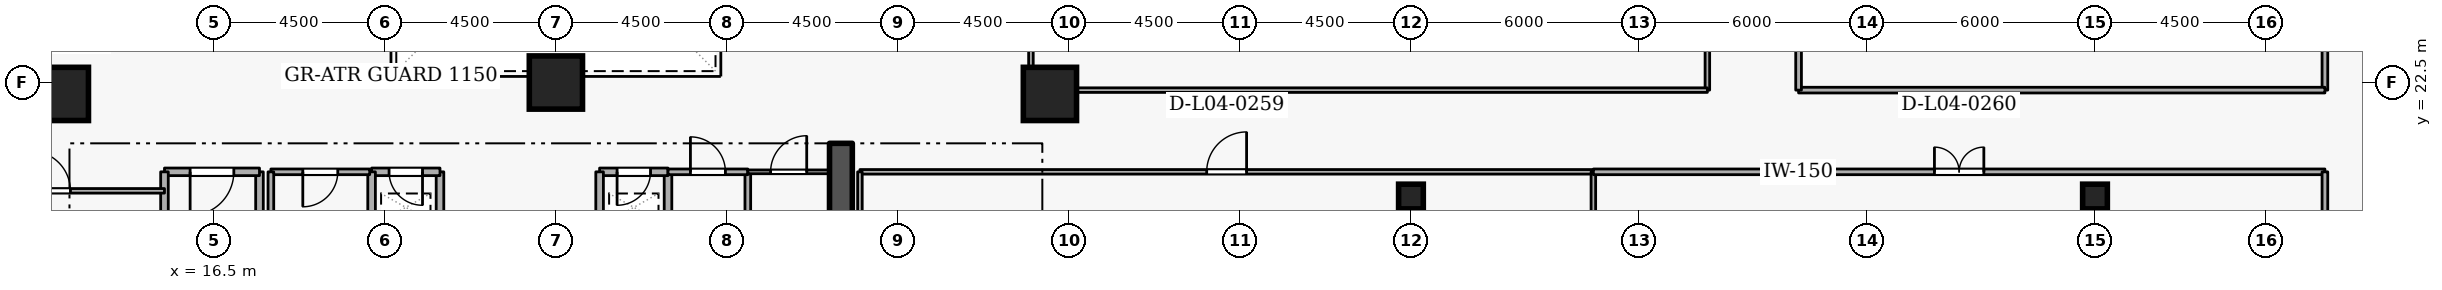
"""IFC4 building model, lengths in metres.
Left out: names, types, materials, properties, quantities, classifications, styles, units other than length and angle.
Written with IfcOpenShell. Run it as: python <this file> out.ifc"""

import sys

from ifc_helpers import new_model, si_unit, direction, frame, frame_2d, origin, origin_2d, place, context, subcontext, project, spatial, rectangle, extrude, element, fill, save


model = new_model("IFC4")
c1 = context("Model", 3, precision=1e-05, world=origin(), true_north=direction((0.0, 1.0)))
c2 = subcontext(c1, "Body", "Model", "MODEL_VIEW")
j1 = project(units=[si_unit("LENGTHUNIT", "METRE"), si_unit("PLANEANGLEUNIT", "RADIAN")], contexts=[c1])
p1 = place(None, origin())
s1 = spatial("IfcSite", under=j1, at=p1, CompositionType="ELEMENT")
p2 = place(p1, origin())
s2 = spatial("IfcBuilding", under=s1, at=p2, CompositionType="ELEMENT")
p3 = place(p2, frame((0.0, 0.0, 18.6)))
s3 = spatial("IfcBuildingStorey", under=s2, at=p3, CompositionType="ELEMENT", Elevation=18.6)
p4 = place(p3, frame((33.0, 15.2, 0.0), z_axis=(0.0, 0.0, 1.0), x_axis=(0.0, 1.0, 0.0)))
e1 = element("IfcWall", 1, at=p4, inside=s3, PredefinedType="SHEAR", context=c2, shape_type="SweptSolid", body=[
    extrude(rectangle(XDim=5.7, YDim=0.6, at=frame_2d((2.85, 0.0))), origin(), (0.0, 0.0, 1.0), 4.5),
])
for number, where, z_axis, x_axis in (
    (2, (12.5, 22.2, 0.0), (0.0, 0.0, 1.0), (1.0, 0.0, 0.0)),
    (3, (38.5, 22.2, 0.0), (0.0, 0.0, 1.0), (1.0, 0.0, 0.0)),
    (4, (25.5, 22.5, 0.0), (0.0, 0.0, 1.0), (1.0, 0.0, 0.0)),
):
    element("IfcColumn", number, at=place(p3, frame(where, z_axis=z_axis, x_axis=x_axis)), inside=s3, PredefinedType="COLUMN", context=c2, shape_type="SweptSolid", body=[
        extrude(rectangle(XDim=1.4, YDim=1.4, at=origin_2d()), origin(), (0.0, 0.0, 1.0), 4.5),
    ])
for number, where, z_axis, x_axis in (
    (5, (48.0, 19.5, 0.0), (0.0, 0.0, 1.0), (1.0, 0.0, 0.0)),
    (6, (66.0, 19.5, 0.0), (0.0, 0.0, 1.0), (1.0, 0.0, 0.0)),
):
    element("IfcColumn", number, at=place(p3, frame(where, z_axis=z_axis, x_axis=x_axis)), inside=s3, PredefinedType="COLUMN", context=c2, shape_type="SweptSolid", body=[
        extrude(rectangle(XDim=0.65, YDim=0.65, at=origin_2d()), origin(), (0.0, 0.0, 1.0), 4.5),
    ])
p5 = place(p3, frame((17.7, 18.4, 0.0), z_axis=(0.0, 0.0, 1.0), x_axis=(0.0, 1.0, 0.0)))
e7 = element("IfcWall", 7, at=p5, inside=s3, PredefinedType="STANDARD", context=c2, shape_type="SweptSolid", body=[
    extrude(rectangle(XDim=1.75, YDim=0.2, at=frame_2d((0.875, 0.0))), origin(), (0.0, 0.0, 1.0), 3.365),
])
p6 = place(p3, frame((17.7, 20.15, 0.0), z_axis=(0.0, 0.0, 1.0), x_axis=(-1.0, 0.0, 0.0)))
e8 = element("IfcWall", 8, at=p6, inside=s3, PredefinedType="STANDARD", context=c2, shape_type="SweptSolid", body=[
    extrude(rectangle(XDim=2.5, YDim=0.2, at=frame_2d((1.25, 0.0))), origin(), (0.0, 0.0, 1.0), 4.16),
])
p7 = place(p6, frame((0.675, 0.0, 0.0)))
e9 = element("IfcOpeningElement", 9, at=p7, cuts=e8, PredefinedType="OPENING", context=c2, shape_type="SweptSolid", body=[
    extrude(rectangle(XDim=1.15, YDim=2.1, at=frame_2d((0.575, 1.05))), frame((0.0, 0.11, 0.0), z_axis=(0.0, -1.0, 0.0), x_axis=(1.0, 0.0, 0.0)), (0.0, 0.0, 1.0), 0.22),
])
p8 = place(p3, frame((15.2, 20.15, 0.0), z_axis=(0.0, 0.0, 1.0), x_axis=(0.0, -1.0, 0.0)))
e10 = element("IfcWall", 10, at=p8, inside=s3, PredefinedType="STANDARD", context=c2, shape_type="SweptSolid", body=[
    extrude(rectangle(XDim=5.15, YDim=0.2, at=frame_2d((2.575, 0.0))), origin(), (0.0, 0.0, 1.0), 4.16),
])
p9 = place(p3, frame((28.45, 18.65, 0.0), z_axis=(0.0, 0.0, 1.0), x_axis=(0.0, 1.0, 0.0)))
e11 = element("IfcWall", 11, at=p9, inside=s3, PredefinedType="STANDARD", context=c2, shape_type="SweptSolid", body=[
    extrude(rectangle(XDim=1.5, YDim=0.2, at=frame_2d((0.75, 0.0))), origin(), (0.0, 0.0, 1.0), 4.16),
])
p10 = place(p3, frame((28.45, 20.15, 0.0), z_axis=(0.0, 0.0, 1.0), x_axis=(-1.0, 0.0, 0.0)))
e12 = element("IfcWall", 12, at=p10, inside=s3, PredefinedType="STANDARD", context=c2, shape_type="SweptSolid", body=[
    extrude(rectangle(XDim=1.8, YDim=0.2, at=frame_2d((0.9, 0.0))), origin(), (0.0, 0.0, 1.0), 4.16),
])
p11 = place(p10, frame((0.46, 0.0, 0.0)))
e13 = element("IfcOpeningElement", 13, at=p11, cuts=e12, PredefinedType="OPENING", context=c2, shape_type="SweptSolid", body=[
    extrude(rectangle(XDim=0.88, YDim=2.04, at=frame_2d((0.44, 1.02))), frame((0.0, 0.11, 0.0), z_axis=(0.0, -1.0, 0.0), x_axis=(1.0, 0.0, 0.0)), (0.0, 0.0, 1.0), 0.22),
])
for number, where, z_axis, x_axis in (
    (14, (26.65, 20.15, 0.0), (0.0, 0.0, 1.0), (0.0, -1.0, 0.0)),
    (15, (22.45, 18.65, 0.0), (0.0, 0.0, 1.0), (0.0, 1.0, 0.0)),
):
    element("IfcWall", number, at=place(p3, frame(where, z_axis=z_axis, x_axis=x_axis)), inside=s3, PredefinedType="STANDARD", context=c2, shape_type="SweptSolid", body=[
        extrude(rectangle(XDim=1.5, YDim=0.2, at=frame_2d((0.75, 0.0))), origin(), (0.0, 0.0, 1.0), 4.16),
    ])
p12 = place(p3, frame((22.45, 20.15, 0.0), z_axis=(0.0, 0.0, 1.0), x_axis=(-1.0, 0.0, 0.0)))
e16 = element("IfcWall", 16, at=p12, inside=s3, PredefinedType="STANDARD", context=c2, shape_type="SweptSolid", body=[
    extrude(rectangle(XDim=1.8, YDim=0.2, at=frame_2d((0.9, 0.0))), origin(), (0.0, 0.0, 1.0), 4.16),
])
p13 = place(p12, frame((0.46, 0.0, 0.0)))
e17 = element("IfcOpeningElement", 17, at=p13, cuts=e16, PredefinedType="OPENING", context=c2, shape_type="SweptSolid", body=[
    extrude(rectangle(XDim=0.88, YDim=2.04, at=frame_2d((0.44, 1.02))), frame((0.0, 0.11, 0.0), z_axis=(0.0, -1.0, 0.0), x_axis=(1.0, 0.0, 0.0)), (0.0, 0.0, 1.0), 0.22),
])
p14 = place(p3, frame((20.65, 20.15, 0.0), z_axis=(0.0, 0.0, 1.0), x_axis=(0.0, -1.0, 0.0)))
e18 = element("IfcWall", 18, at=p14, inside=s3, PredefinedType="STANDARD", context=c2, shape_type="SweptSolid", body=[
    extrude(rectangle(XDim=1.5, YDim=0.2, at=frame_2d((0.75, 0.0))), origin(), (0.0, 0.0, 1.0), 4.16),
])
p15 = place(p3, frame((20.6, 20.15, 0.0), z_axis=(0.0, 0.0, 1.0), x_axis=(-1.0, 0.0, 0.0)))
e19 = element("IfcWall", 19, at=p15, inside=s3, PredefinedType="PARTITIONING", context=c2, shape_type="SweptSolid", body=[
    extrude(rectangle(XDim=2.6, YDim=0.15, at=frame_2d((1.3, 0.0))), origin(), (0.0, 0.0, 1.0), 4.16),
])
p16 = place(p15, frame((0.84, 0.0, 0.0)))
e20 = element("IfcOpeningElement", 20, at=p16, cuts=e19, PredefinedType="OPENING", context=c2, shape_type="SweptSolid", body=[
    extrude(rectangle(XDim=0.92, YDim=2.08, at=frame_2d((0.46, 1.04))), frame((0.0, 0.085, 0.0), z_axis=(0.0, -1.0, 0.0), x_axis=(1.0, 0.0, 0.0)), (0.0, 0.0, 1.0), 0.17),
])
p17 = place(p3, frame((18.0, 20.15, 0.0), z_axis=(0.0, 0.0, 1.0), x_axis=(0.0, -1.0, 0.0)))
e21 = element("IfcWall", 21, at=p17, inside=s3, PredefinedType="PARTITIONING", context=c2, shape_type="SweptSolid", body=[
    extrude(rectangle(XDim=1.5, YDim=0.15, at=frame_2d((0.75, 0.0))), origin(), (0.0, 0.0, 1.0), 3.365),
])
p18 = place(p3, frame((30.55, 20.15, 0.0), z_axis=(0.0, 0.0, 1.0), x_axis=(0.0, -1.0, 0.0)))
e22 = element("IfcWall", 22, at=p18, inside=s3, PredefinedType="PARTITIONING", context=c2, shape_type="SweptSolid", body=[
    extrude(rectangle(XDim=1.5, YDim=0.15, at=frame_2d((0.75, 0.0))), origin(), (0.0, 0.0, 1.0), 4.16),
])
p19 = place(p3, frame((28.45, 20.15, 0.0), z_axis=(0.0, 0.0, 1.0), x_axis=(1.0, 0.0, 0.0)))
e23 = element("IfcWall", 23, at=p19, inside=s3, PredefinedType="PARTITIONING", context=c2, shape_type="SweptSolid", body=[
    extrude(rectangle(XDim=2.1, YDim=0.15, at=frame_2d((1.05, 0.0))), origin(), (0.0, 0.0, 1.0), 4.16),
])
p20 = place(p19, frame((0.59, 0.0, 0.0)))
e24 = element("IfcOpeningElement", 24, at=p20, cuts=e23, PredefinedType="OPENING", context=c2, shape_type="SweptSolid", body=[
    extrude(rectangle(XDim=0.92, YDim=2.08, at=frame_2d((0.46, 1.04))), frame((0.0, 0.085, 0.0), z_axis=(0.0, -1.0, 0.0), x_axis=(1.0, 0.0, 0.0)), (0.0, 0.0, 1.0), 0.17),
])
p21 = place(p3, frame((30.55, 20.15, 0.0), z_axis=(0.0, 0.0, 1.0), x_axis=(1.0, 0.0, 0.0)))
e25 = element("IfcWall", 25, at=p21, inside=s3, PredefinedType="PARTITIONING", context=c2, shape_type="SweptSolid", body=[
    extrude(rectangle(XDim=2.15, YDim=0.1, at=frame_2d((1.075, 0.0))), origin(), (0.0, 0.0, 1.0), 4.16),
])
p22 = place(p21, frame((0.6, 0.0, 0.0)))
e26 = element("IfcOpeningElement", 26, at=p22, cuts=e25, PredefinedType="OPENING", context=c2, shape_type="SweptSolid", body=[
    extrude(rectangle(XDim=0.95, YDim=2.1, at=frame_2d((0.475, 1.05))), frame((0.0, 0.06, 0.0), z_axis=(0.0, -1.0, 0.0), x_axis=(1.0, 0.0, 0.0)), (0.0, 0.0, 1.0), 0.12),
])
p23 = place(p3, frame((9.2, 19.65, 0.0), z_axis=(0.0, 0.0, 1.0), x_axis=(1.0, 0.0, 0.0)))
e27 = element("IfcWall", 27, at=p23, inside=s3, PredefinedType="PARTITIONING", context=c2, shape_type="SweptSolid", body=[
    extrude(rectangle(XDim=6.0, YDim=0.12, at=frame_2d((3.0, 0.0))), origin(), (0.0, 0.0, 1.0), 4.16),
])
p24 = place(p23, frame((2.475, 0.0, 0.0)))
e28 = element("IfcOpeningElement", 28, at=p24, cuts=e27, PredefinedType="OPENING", context=c2, shape_type="SweptSolid", body=[
    extrude(rectangle(XDim=1.05, YDim=2.1, at=frame_2d((0.525, 1.05))), frame((0.0, 0.07, 0.0), z_axis=(0.0, -1.0, 0.0), x_axis=(1.0, 0.0, 0.0)), (0.0, 0.0, 1.0), 0.14),
])
p25 = place(p3, frame((33.5, 20.15, 0.0), z_axis=(0.0, 0.0, 1.0), x_axis=(1.0, 0.0, 0.0)))
e29 = element("IfcWall", 29, at=p25, inside=s3, PredefinedType="PARTITIONING", context=c2, shape_type="SweptSolid", body=[
    extrude(rectangle(XDim=19.3, YDim=0.12, at=frame_2d((9.65, 0.0))), origin(), (0.0, 0.0, 1.0), 4.16),
])
p26 = place(p25, frame((9.125, 0.0, 0.0)))
e30 = element("IfcOpeningElement", 30, at=p26, cuts=e29, PredefinedType="OPENING", context=c2, shape_type="SweptSolid", body=[
    extrude(rectangle(XDim=1.05, YDim=2.1, at=frame_2d((0.525, 1.05))), frame((0.0, 0.07, 0.0), z_axis=(0.0, -1.0, 0.0), x_axis=(1.0, 0.0, 0.0)), (0.0, 0.0, 1.0), 0.14),
])
p27 = place(p3, frame((52.8, 20.15, 0.0), z_axis=(0.0, 0.0, 1.0), x_axis=(0.0, -1.0, 0.0)))
e31 = element("IfcWall", 31, at=p27, inside=s3, PredefinedType="PARTITIONING", context=c2, shape_type="SweptSolid", body=[
    extrude(rectangle(XDim=9.33, YDim=0.12, at=frame_2d((4.665, 0.0))), origin(), (0.0, 0.0, 1.0), 4.16),
])
p28 = place(p3, frame((33.5, 17.648, 0.0), z_axis=(0.0, 0.0, 1.0), x_axis=(0.0, 1.0, 0.0)))
e32 = element("IfcWall", 32, at=p28, inside=s3, PredefinedType="PARTITIONING", context=c2, shape_type="SweptSolid", body=[
    extrude(rectangle(XDim=2.502, YDim=0.12, at=frame_2d((1.251, 0.0))), origin(), (0.0, 0.0, 1.0), 4.16),
])
p29 = place(p3, frame((52.8, 20.15, 0.0), z_axis=(0.0, 0.0, 1.0), x_axis=(1.0, 0.0, 0.0)))
e33 = element("IfcWall", 33, at=p29, inside=s3, PredefinedType="PARTITIONING", context=c2, shape_type="SweptSolid", body=[
    extrude(rectangle(XDim=19.25, YDim=0.15, at=frame_2d((9.625, 0.0))), origin(), (0.0, 0.0, 1.0), 4.16),
])
p30 = place(p29, frame((8.975, 0.0, 0.0)))
e34 = element("IfcOpeningElement", 34, at=p30, cuts=e33, PredefinedType="OPENING", context=c2, shape_type="SweptSolid", body=[
    extrude(rectangle(XDim=1.3, YDim=2.12, at=frame_2d((0.65, 1.06))), frame((0.0, 0.085, 0.0), z_axis=(0.0, -1.0, 0.0), x_axis=(1.0, 0.0, 0.0)), (0.0, 0.0, 1.0), 0.17),
])
p31 = place(p3, frame((72.05, 20.15, 0.0), z_axis=(0.0, 0.0, 1.0), x_axis=(0.0, -1.0, 0.0)))
e35 = element("IfcWall", 35, at=p31, inside=s3, PredefinedType="PARTITIONING", context=c2, shape_type="SweptSolid", body=[
    extrude(rectangle(XDim=5.35, YDim=0.15, at=frame_2d((2.675, 0.0))), origin(), (0.0, 0.0, 1.0), 4.16),
])
p32 = place(p3, frame((55.8, 32.28, 0.0), z_axis=(0.0, 0.0, 1.0), x_axis=(0.0, -1.0, 0.0)))
e36 = element("IfcWall", 36, at=p32, inside=s3, PredefinedType="PARTITIONING", context=c2, shape_type="SweptSolid", body=[
    extrude(rectangle(XDim=9.98, YDim=0.12, at=frame_2d((4.99, 0.0))), origin(), (0.0, 0.0, 1.0), 4.16),
])
p33 = place(p3, frame((55.8, 22.3, 0.0), z_axis=(0.0, 0.0, 1.0), x_axis=(-1.0, 0.0, 0.0)))
e37 = element("IfcWall", 37, at=p33, inside=s3, PredefinedType="PARTITIONING", context=c2, shape_type="SweptSolid", body=[
    extrude(rectangle(XDim=17.8, YDim=0.12, at=frame_2d((8.9, 0.0))), origin(), (0.0, 0.0, 1.0), 4.16),
])
p34 = place(p3, frame((38.0, 22.3, 0.0), z_axis=(0.0, 0.0, 1.0), x_axis=(0.0, 1.0, 0.0)))
e38 = element("IfcWall", 38, at=p34, inside=s3, PredefinedType="PARTITIONING", context=c2, shape_type="SweptSolid", body=[
    extrude(rectangle(XDim=9.98, YDim=0.12, at=frame_2d((4.99, 0.0))), origin(), (0.0, 0.0, 1.0), 4.16),
])
p35 = place(p3, frame((72.05, 32.28, 0.0), z_axis=(0.0, 0.0, 1.0), x_axis=(0.0, -1.0, 0.0)))
e39 = element("IfcWall", 39, at=p35, inside=s3, PredefinedType="PARTITIONING", context=c2, shape_type="SweptSolid", body=[
    extrude(rectangle(XDim=9.98, YDim=0.15, at=frame_2d((4.99, 0.0))), origin(), (0.0, 0.0, 1.0), 4.16),
])
p36 = place(p3, frame((72.05, 22.3, 0.0), z_axis=(0.0, 0.0, 1.0), x_axis=(-1.0, 0.0, 0.0)))
e40 = element("IfcWall", 40, at=p36, inside=s3, PredefinedType="PARTITIONING", context=c2, shape_type="SweptSolid", body=[
    extrude(rectangle(XDim=13.85, YDim=0.15, at=frame_2d((6.925, 0.0))), origin(), (0.0, 0.0, 1.0), 4.16),
])
p37 = place(p3, frame((58.2, 22.3, 0.0), z_axis=(0.0, 0.0, 1.0), x_axis=(0.0, 1.0, 0.0)))
e41 = element("IfcWall", 41, at=p37, inside=s3, PredefinedType="PARTITIONING", context=c2, shape_type="SweptSolid", body=[
    extrude(rectangle(XDim=9.98, YDim=0.15, at=frame_2d((4.99, 0.0))), origin(), (0.0, 0.0, 1.0), 4.16),
])
p38 = place(p7, origin())
e42 = element("IfcDoor", 42, at=p38, inside=s3, OperationType="SINGLE_SWING_RIGHT", PredefinedType="DOOR", context=c2, shape_type="SweptSolid", body=[
    extrude(rectangle(XDim=1.15, YDim=2.1, at=frame_2d((0.575, 1.05))), frame((0.0, 0.025, 0.0), z_axis=(0.0, -1.0, 0.0), x_axis=(1.0, 0.0, 0.0)), (0.0, 0.0, 1.0), 0.05),
])
fill(e9, e42)
p39 = place(p11, origin())
e43 = element("IfcDoor", 43, at=p39, inside=s3, OperationType="SINGLE_SWING_RIGHT", PredefinedType="DOOR", context=c2, shape_type="SweptSolid", body=[
    extrude(rectangle(XDim=0.88, YDim=2.04, at=frame_2d((0.44, 1.02))), frame((0.0, 0.025, 0.0), z_axis=(0.0, -1.0, 0.0), x_axis=(1.0, 0.0, 0.0)), (0.0, 0.0, 1.0), 0.05),
])
fill(e13, e43)
p40 = place(p13, origin())
e44 = element("IfcDoor", 44, at=p40, inside=s3, OperationType="SINGLE_SWING_LEFT", PredefinedType="DOOR", context=c2, shape_type="SweptSolid", body=[
    extrude(rectangle(XDim=0.88, YDim=2.04, at=frame_2d((0.44, 1.02))), frame((0.0, 0.025, 0.0), z_axis=(0.0, -1.0, 0.0), x_axis=(1.0, 0.0, 0.0)), (0.0, 0.0, 1.0), 0.05),
])
fill(e17, e44)
p41 = place(p16, origin())
e45 = element("IfcDoor", 45, at=p41, inside=s3, OperationType="SINGLE_SWING_RIGHT", PredefinedType="DOOR", context=c2, shape_type="SweptSolid", body=[
    extrude(rectangle(XDim=0.92, YDim=2.08, at=frame_2d((0.46, 1.04))), frame((0.0, 0.025, 0.0), z_axis=(0.0, -1.0, 0.0), x_axis=(1.0, 0.0, 0.0)), (0.0, 0.0, 1.0), 0.05),
])
fill(e20, e45)
p42 = place(p20, origin())
e46 = element("IfcDoor", 46, at=p42, inside=s3, OperationType="SINGLE_SWING_LEFT", PredefinedType="DOOR", context=c2, shape_type="SweptSolid", body=[
    extrude(rectangle(XDim=0.92, YDim=2.08, at=frame_2d((0.46, 1.04))), frame((0.0, 0.025, 0.0), z_axis=(0.0, -1.0, 0.0), x_axis=(1.0, 0.0, 0.0)), (0.0, 0.0, 1.0), 0.05),
])
fill(e24, e46)
p43 = place(p22, origin())
e47 = element("IfcDoor", 47, at=p43, inside=s3, OperationType="SINGLE_SWING_RIGHT", PredefinedType="DOOR", context=c2, shape_type="SweptSolid", body=[
    extrude(rectangle(XDim=0.95, YDim=2.1, at=frame_2d((0.475, 1.05))), frame((0.0, 0.025, 0.0), z_axis=(0.0, -1.0, 0.0), x_axis=(1.0, 0.0, 0.0)), (0.0, 0.0, 1.0), 0.05),
])
fill(e26, e47)
p44 = place(p24, origin())
e48 = element("IfcDoor", 48, at=p44, inside=s3, OperationType="SINGLE_SWING_LEFT", PredefinedType="DOOR", context=c2, shape_type="SweptSolid", body=[
    extrude(rectangle(XDim=1.05, YDim=2.1, at=frame_2d((0.525, 1.05))), frame((0.0, 0.025, 0.0), z_axis=(0.0, -1.0, 0.0), x_axis=(1.0, 0.0, 0.0)), (0.0, 0.0, 1.0), 0.05),
])
fill(e28, e48)
p45 = place(p26, origin())
e49 = element("IfcDoor", 49, at=p45, inside=s3, OperationType="SINGLE_SWING_RIGHT", PredefinedType="DOOR", context=c2, shape_type="SweptSolid", body=[
    extrude(rectangle(XDim=1.05, YDim=2.1, at=frame_2d((0.525, 1.05))), frame((0.0, 0.025, 0.0), z_axis=(0.0, -1.0, 0.0), x_axis=(1.0, 0.0, 0.0)), (0.0, 0.0, 1.0), 0.05),
])
fill(e30, e49)
p46 = place(p30, origin())
e50 = element("IfcDoor", 50, at=p46, inside=s3, OperationType="DOUBLE_DOOR_SINGLE_SWING", PredefinedType="DOOR", context=c2, shape_type="SweptSolid", body=[
    extrude(rectangle(XDim=1.3, YDim=2.12, at=frame_2d((0.65, 1.06))), frame((0.0, 0.025, 0.0), z_axis=(0.0, -1.0, 0.0), x_axis=(1.0, 0.0, 0.0)), (0.0, 0.0, 1.0), 0.05),
])
fill(e34, e50)
save(model, sys.argv[1])
